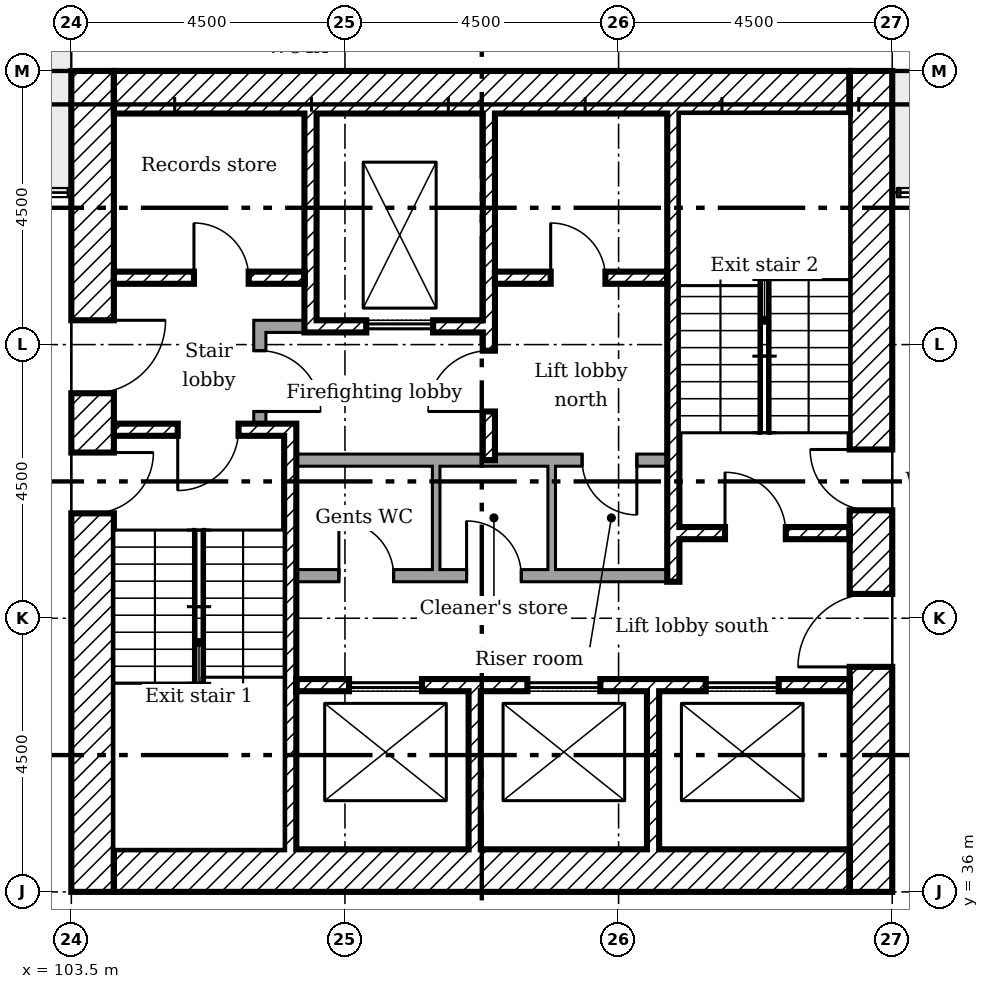
"""IFC4 building model, lengths in metres.
Left out: names, types, materials, properties, quantities, classifications, styles, units other than length and angle.
Written with IfcOpenShell. Run it as: python <this file> out.ifc"""

import sys

from ifc_helpers import new_model, si_unit, direction, frame, frame_2d, origin, place, context, subcontext, project, spatial, rectangle, extrude, element, fill, save


model = new_model("IFC4")
c1 = context("Model", 3, precision=1e-05, world=origin(), true_north=direction((0.0, 1.0)))
c2 = subcontext(c1, "Body", "Model", "MODEL_VIEW")
j1 = project(units=[si_unit("LENGTHUNIT", "METRE"), si_unit("PLANEANGLEUNIT", "RADIAN")], contexts=[c1])
p1 = place(None, origin())
s1 = spatial("IfcSite", under=j1, at=p1, CompositionType="ELEMENT")
p2 = place(p1, origin())
s2 = spatial("IfcBuilding", under=s1, at=p2, CompositionType="ELEMENT")
p3 = place(p2, frame((0.0, 0.0, 95.6)))
s3 = spatial("IfcBuildingStorey", under=s2, at=p3, CompositionType="ELEMENT", Elevation=95.6)
p4 = place(p3, frame((116.65, 36.0, 0.0), z_axis=(0.0, 0.0, 1.0), x_axis=(0.0, 1.0, 0.0)))
e1 = element("IfcWall", 1, at=p4, inside=s3, PredefinedType="SHEAR", context=c2, shape_type="SweptSolid", body=[
    extrude(rectangle(XDim=13.5, YDim=0.7, at=frame_2d((6.75, 0.0))), origin(), (0.0, 0.0, 1.0), 3.35),
])
p5 = place(p4, frame((3.7, 0.0, 0.0)))
e2 = element("IfcOpeningElement", 2, at=p5, cuts=e1, PredefinedType="OPENING", context=c2, shape_type="SweptSolid", body=[
    extrude(rectangle(XDim=1.2, YDim=2.1, at=frame_2d((0.6, 1.05))), frame((0.0, 0.36, 0.0), z_axis=(0.0, -1.0, 0.0), x_axis=(1.0, 0.0, 0.0)), (0.0, 0.0, 1.0), 0.72),
])
p6 = place(p4, frame((6.275, 0.0, 0.0)))
e3 = element("IfcOpeningElement", 3, at=p6, cuts=e1, PredefinedType="OPENING", context=c2, shape_type="SweptSolid", body=[
    extrude(rectangle(XDim=1.0, YDim=2.1, at=frame_2d((0.5, 1.05))), frame((0.0, 0.36, 0.0), z_axis=(0.0, -1.0, 0.0), x_axis=(1.0, 0.0, 0.0)), (0.0, 0.0, 1.0), 0.72),
])
for number, where in (
    (4, (104.2, 49.15, 0.0)),
    (5, (104.2, 36.35, 0.0)),
):
    element("IfcWall", number, at=place(p3, frame(where)), inside=s3, PredefinedType="SHEAR", context=c2, shape_type="SweptSolid", body=[
        extrude(rectangle(XDim=12.1, YDim=0.7, at=frame_2d((6.05, 0.0))), origin(), (0.0, 0.0, 1.0), 3.35),
    ])
p7 = place(p3, frame((103.85, 36.0, 0.0), z_axis=(0.0, 0.0, 1.0), x_axis=(0.0, 1.0, 0.0)))
e6 = element("IfcWall", 6, at=p7, inside=s3, PredefinedType="SHEAR", context=c2, shape_type="SweptSolid", body=[
    extrude(rectangle(XDim=13.5, YDim=0.7, at=frame_2d((6.75, 0.0))), origin(), (0.0, 0.0, 1.0), 3.35),
])
p8 = place(p7, frame((8.2, 0.0, 0.0)))
e7 = element("IfcOpeningElement", 7, at=p8, cuts=e6, PredefinedType="OPENING", context=c2, shape_type="SweptSolid", body=[
    extrude(rectangle(XDim=1.2, YDim=2.1, at=frame_2d((0.6, 1.05))), frame((0.0, 0.36, 0.0), z_axis=(0.0, -1.0, 0.0), x_axis=(1.0, 0.0, 0.0)), (0.0, 0.0, 1.0), 0.72),
])
p9 = place(p7, frame((6.225, 0.0, 0.0)))
e8 = element("IfcOpeningElement", 8, at=p9, cuts=e6, PredefinedType="OPENING", context=c2, shape_type="SweptSolid", body=[
    extrude(rectangle(XDim=1.0, YDim=2.1, at=frame_2d((0.5, 1.05))), frame((0.0, 0.36, 0.0), z_axis=(0.0, -1.0, 0.0), x_axis=(1.0, 0.0, 0.0)), (0.0, 0.0, 1.0), 0.72),
])
p10 = place(p3, frame((107.433, 48.8, 0.0), z_axis=(0.0, 0.0, 1.0), x_axis=(0.0, -1.0, 0.0)))
e9 = element("IfcWall", 9, at=p10, inside=s3, PredefinedType="SHEAR", context=c2, shape_type="SweptSolid", body=[
    extrude(rectangle(XDim=3.6, YDim=0.2, at=frame_2d((1.8, 0.0))), origin(), (0.0, 0.0, 1.0), 3.35),
])
p11 = place(p3, frame((110.367, 48.8, 0.0), z_axis=(0.0, 0.0, 1.0), x_axis=(0.0, -1.0, 0.0)))
e10 = element("IfcWall", 10, at=p11, inside=s3, PredefinedType="SHEAR", context=c2, shape_type="SweptSolid", body=[
    extrude(rectangle(XDim=5.7, YDim=0.2, at=frame_2d((2.85, 0.0))), origin(), (0.0, 0.0, 1.0), 3.35),
])
p12 = place(p11, frame((3.9, 0.0, 0.0)))
e11 = element("IfcOpeningElement", 11, at=p12, cuts=e10, PredefinedType="OPENING", context=c2, shape_type="SweptSolid", body=[
    extrude(rectangle(XDim=1.0, YDim=2.1, at=frame_2d((0.5, 1.05))), frame((0.0, 0.11, 0.0), z_axis=(0.0, -1.0, 0.0), x_axis=(1.0, 0.0, 0.0)), (0.0, 0.0, 1.0), 0.22),
])
for number, where, z_axis, x_axis in (
    (12, (110.133, 36.7, 0.0), (0.0, 0.0, 1.0), (0.0, 1.0, 0.0)),
    (13, (113.067, 36.7, 0.0), (0.0, 0.0, 1.0), (0.0, 1.0, 0.0)),
):
    element("IfcWall", number, at=place(p3, frame(where, z_axis=z_axis, x_axis=x_axis)), inside=s3, PredefinedType="SHEAR", context=c2, shape_type="SweptSolid", body=[
        extrude(rectangle(XDim=2.6, YDim=0.2, at=frame_2d((1.3, 0.0))), origin(), (0.0, 0.0, 1.0), 3.35),
    ])
p13 = place(p3, frame((106.5, 45.3, 0.0)))
e14 = element("IfcWall", 14, at=p13, inside=s3, PredefinedType="PARTITIONING", context=c2, shape_type="SweptSolid", body=[
    extrude(rectangle(XDim=0.833, YDim=0.2, at=frame_2d((0.417, 0.0))), origin(), (0.0, 0.0, 1.0), 3.35),
])
p14 = place(p3, frame((106.6, 43.7, 0.0), z_axis=(0.0, 0.0, 1.0), x_axis=(0.0, 1.0, 0.0)))
e15 = element("IfcWall", 15, at=p14, inside=s3, PredefinedType="PARTITIONING", context=c2, shape_type="SweptSolid", body=[
    extrude(rectangle(XDim=1.5, YDim=0.2, at=frame_2d((0.75, 0.0))), origin(), (0.0, 0.0, 1.0), 3.35),
])
p15 = place(p14, frame((0.2, 0.0, 0.0)))
e16 = element("IfcOpeningElement", 16, at=p15, cuts=e15, PredefinedType="OPENING", context=c2, shape_type="SweptSolid", body=[
    extrude(rectangle(XDim=1.0, YDim=2.1, at=frame_2d((0.5, 1.05))), frame((0.0, 0.11, 0.0), z_axis=(0.0, -1.0, 0.0), x_axis=(1.0, 0.0, 0.0)), (0.0, 0.0, 1.0), 0.22),
])
p16 = place(p3, frame((104.2, 46.1, 0.0)))
e17 = element("IfcWall", 17, at=p16, inside=s3, PredefinedType="SHEAR", context=c2, shape_type="SweptSolid", body=[
    extrude(rectangle(XDim=3.133, YDim=0.2, at=frame_2d((1.567, 0.0))), origin(), (0.0, 0.0, 1.0), 3.35),
])
p17 = place(p16, frame((1.317, 0.0, 0.0)))
e18 = element("IfcOpeningElement", 18, at=p17, cuts=e17, PredefinedType="OPENING", context=c2, shape_type="SweptSolid", body=[
    extrude(rectangle(XDim=0.9, YDim=2.1, at=frame_2d((0.45, 1.05))), frame((0.0, 0.11, 0.0), z_axis=(0.0, -1.0, 0.0), x_axis=(1.0, 0.0, 0.0)), (0.0, 0.0, 1.0), 0.22),
])
p18 = place(p3, frame((110.467, 46.1, 0.0)))
e19 = element("IfcWall", 19, at=p18, inside=s3, PredefinedType="SHEAR", context=c2, shape_type="SweptSolid", body=[
    extrude(rectangle(XDim=2.833, YDim=0.2, at=frame_2d((1.417, 0.0))), origin(), (0.0, 0.0, 1.0), 3.35),
])
p19 = place(p18, frame((0.917, 0.0, 0.0)))
e20 = element("IfcOpeningElement", 20, at=p19, cuts=e19, PredefinedType="OPENING", context=c2, shape_type="SweptSolid", body=[
    extrude(rectangle(XDim=0.9, YDim=2.1, at=frame_2d((0.45, 1.05))), frame((0.0, 0.11, 0.0), z_axis=(0.0, -1.0, 0.0), x_axis=(1.0, 0.0, 0.0)), (0.0, 0.0, 1.0), 0.22),
])
p20 = place(p3, frame((107.533, 45.3, 0.0)))
e21 = element("IfcWall", 21, at=p20, inside=s3, PredefinedType="SHEAR", context=c2, shape_type="SweptSolid", body=[
    extrude(rectangle(XDim=2.733, YDim=0.2, at=frame_2d((1.367, 0.0))), origin(), (0.0, 0.0, 1.0), 3.35),
])
p21 = place(p20, frame((0.817, 0.0, 0.0)))
e22 = element("IfcOpeningElement", 22, at=p21, cuts=e21, PredefinedType="OPENING", context=c2, shape_type="SweptSolid", body=[
    extrude(rectangle(XDim=1.1, YDim=2.1, at=frame_2d((0.55, 1.05))), frame((0.0, 0.11, 0.0), z_axis=(0.0, -1.0, 0.0), x_axis=(1.0, 0.0, 0.0)), (0.0, 0.0, 1.0), 0.22),
])
p22 = place(p3, frame((107.2, 39.4, 0.0)))
e23 = element("IfcWall", 23, at=p22, inside=s3, PredefinedType="SHEAR", context=c2, shape_type="SweptSolid", body=[
    extrude(rectangle(XDim=9.1, YDim=0.2, at=frame_2d((4.55, 0.0))), origin(), (0.0, 0.0, 1.0), 3.35),
])
p23 = place(p22, frame((0.867, 0.0, 0.0)))
e24 = element("IfcOpeningElement", 24, at=p23, cuts=e23, PredefinedType="OPENING", context=c2, shape_type="SweptSolid", body=[
    extrude(rectangle(XDim=1.2, YDim=2.1, at=frame_2d((0.6, 1.05))), frame((0.0, 0.11, 0.0), z_axis=(0.0, -1.0, 0.0), x_axis=(1.0, 0.0, 0.0)), (0.0, 0.0, 1.0), 0.22),
])
p24 = place(p22, frame((3.8, 0.0, 0.0)))
e25 = element("IfcOpeningElement", 25, at=p24, cuts=e23, PredefinedType="OPENING", context=c2, shape_type="SweptSolid", body=[
    extrude(rectangle(XDim=1.2, YDim=2.1, at=frame_2d((0.6, 1.05))), frame((0.0, 0.11, 0.0), z_axis=(0.0, -1.0, 0.0), x_axis=(1.0, 0.0, 0.0)), (0.0, 0.0, 1.0), 0.22),
])
p25 = place(p22, frame((6.733, 0.0, 0.0)))
e26 = element("IfcOpeningElement", 26, at=p25, cuts=e23, PredefinedType="OPENING", context=c2, shape_type="SweptSolid", body=[
    extrude(rectangle(XDim=1.2, YDim=2.1, at=frame_2d((0.6, 1.05))), frame((0.0, 0.11, 0.0), z_axis=(0.0, -1.0, 0.0), x_axis=(1.0, 0.0, 0.0)), (0.0, 0.0, 1.0), 0.22),
])
p26 = place(p3, frame((107.1, 36.7, 0.0), z_axis=(0.0, 0.0, 1.0), x_axis=(0.0, 1.0, 0.0)))
e27 = element("IfcWall", 27, at=p26, inside=s3, PredefinedType="SHEAR", context=c2, shape_type="SweptSolid", body=[
    extrude(rectangle(XDim=7.0, YDim=0.2, at=frame_2d((3.5, 0.0))), origin(), (0.0, 0.0, 1.0), 3.35),
])
p27 = place(p3, frame((104.2, 43.6, 0.0)))
e28 = element("IfcWall", 28, at=p27, inside=s3, PredefinedType="SHEAR", context=c2, shape_type="SweptSolid", body=[
    extrude(rectangle(XDim=2.8, YDim=0.2, at=frame_2d((1.4, 0.0))), origin(), (0.0, 0.0, 1.0), 3.35),
])
p28 = place(p27, frame((1.05, 0.0, 0.0)))
e29 = element("IfcOpeningElement", 29, at=p28, cuts=e28, PredefinedType="OPENING", context=c2, shape_type="SweptSolid", body=[
    extrude(rectangle(XDim=1.0, YDim=2.1, at=frame_2d((0.5, 1.05))), frame((0.0, 0.11, 0.0), z_axis=(0.0, -1.0, 0.0), x_axis=(1.0, 0.0, 0.0)), (0.0, 0.0, 1.0), 0.22),
])
p29 = place(p3, frame((113.5, 41.9, 0.0)))
e30 = element("IfcWall", 30, at=p29, inside=s3, PredefinedType="SHEAR", context=c2, shape_type="SweptSolid", body=[
    extrude(rectangle(XDim=2.8, YDim=0.2, at=frame_2d((1.4, 0.0))), origin(), (0.0, 0.0, 1.0), 3.35),
])
p30 = place(p29, frame((0.75, 0.0, 0.0)))
e31 = element("IfcOpeningElement", 31, at=p30, cuts=e30, PredefinedType="OPENING", context=c2, shape_type="SweptSolid", body=[
    extrude(rectangle(XDim=1.0, YDim=2.1, at=frame_2d((0.5, 1.05))), frame((0.0, 0.11, 0.0), z_axis=(0.0, -1.0, 0.0), x_axis=(1.0, 0.0, 0.0)), (0.0, 0.0, 1.0), 0.22),
])
p31 = place(p3, frame((113.4, 41.1, 0.0), z_axis=(0.0, 0.0, 1.0), x_axis=(0.0, 1.0, 0.0)))
e32 = element("IfcWall", 32, at=p31, inside=s3, PredefinedType="SHEAR", context=c2, shape_type="SweptSolid", body=[
    extrude(rectangle(XDim=7.7, YDim=0.2, at=frame_2d((3.85, 0.0))), origin(), (0.0, 0.0, 1.0), 3.35),
])
p32 = place(p3, frame((107.2, 43.1, 0.0)))
e33 = element("IfcWall", 33, at=p32, inside=s3, PredefinedType="PARTITIONING", context=c2, shape_type="SweptSolid", body=[
    extrude(rectangle(XDim=6.1, YDim=0.2, at=frame_2d((3.05, 0.0))), origin(), (0.0, 0.0, 1.0), 3.35),
])
p33 = place(p32, frame((4.7, 0.0, 0.0)))
e34 = element("IfcOpeningElement", 34, at=p33, cuts=e33, PredefinedType="OPENING", context=c2, shape_type="SweptSolid", body=[
    extrude(rectangle(XDim=0.9, YDim=2.1, at=frame_2d((0.45, 1.05))), frame((0.0, 0.11, 0.0), z_axis=(0.0, -1.0, 0.0), x_axis=(1.0, 0.0, 0.0)), (0.0, 0.0, 1.0), 0.22),
])
p34 = place(p3, frame((107.2, 41.2, 0.0)))
e35 = element("IfcWall", 35, at=p34, inside=s3, PredefinedType="PARTITIONING", context=c2, shape_type="SweptSolid", body=[
    extrude(rectangle(XDim=6.1, YDim=0.2, at=frame_2d((3.05, 0.0))), origin(), (0.0, 0.0, 1.0), 3.35),
])
p35 = place(p34, frame((0.7, 0.0, 0.0)))
e36 = element("IfcOpeningElement", 36, at=p35, cuts=e35, PredefinedType="OPENING", context=c2, shape_type="SweptSolid", body=[
    extrude(rectangle(XDim=0.9, YDim=2.1, at=frame_2d((0.45, 1.05))), frame((0.0, 0.11, 0.0), z_axis=(0.0, -1.0, 0.0), x_axis=(1.0, 0.0, 0.0)), (0.0, 0.0, 1.0), 0.22),
])
p36 = place(p34, frame((2.8, 0.0, 0.0)))
e37 = element("IfcOpeningElement", 37, at=p36, cuts=e35, PredefinedType="OPENING", context=c2, shape_type="SweptSolid", body=[
    extrude(rectangle(XDim=0.9, YDim=2.1, at=frame_2d((0.45, 1.05))), frame((0.0, 0.11, 0.0), z_axis=(0.0, -1.0, 0.0), x_axis=(1.0, 0.0, 0.0)), (0.0, 0.0, 1.0), 0.22),
])
for number, where, z_axis, x_axis in (
    (38, (109.5, 41.3, 0.0), (0.0, 0.0, 1.0), (0.0, 1.0, 0.0)),
    (39, (111.4, 41.3, 0.0), (0.0, 0.0, 1.0), (0.0, 1.0, 0.0)),
):
    element("IfcWall", number, at=place(p3, frame(where, z_axis=z_axis, x_axis=x_axis)), inside=s3, PredefinedType="PARTITIONING", context=c2, shape_type="SweptSolid", body=[
        extrude(rectangle(XDim=1.7, YDim=0.125, at=frame_2d((0.85, 0.0))), origin(), (0.0, 0.0, 1.0), 3.35),
    ])
p37 = place(p8, frame((1.2, 0.0, 0.0), x_axis=(-1.0, 0.0, 0.0)))
e40 = element("IfcDoor", 40, at=p37, inside=s3, OperationType="SINGLE_SWING_RIGHT", PredefinedType="DOOR", context=c2, shape_type="SweptSolid", body=[
    extrude(rectangle(XDim=1.2, YDim=2.1, at=frame_2d((0.6, 1.05))), frame((0.0, 0.025, 0.0), z_axis=(0.0, -1.0, 0.0), x_axis=(1.0, 0.0, 0.0)), (0.0, 0.0, 1.0), 0.05),
])
fill(e7, e40)
p38 = place(p5, origin())
e41 = element("IfcDoor", 41, at=p38, inside=s3, OperationType="SINGLE_SWING_RIGHT", PredefinedType="DOOR", context=c2, shape_type="SweptSolid", body=[
    extrude(rectangle(XDim=1.2, YDim=2.1, at=frame_2d((0.6, 1.05))), frame((0.0, 0.025, 0.0), z_axis=(0.0, -1.0, 0.0), x_axis=(1.0, 0.0, 0.0)), (0.0, 0.0, 1.0), 0.05),
])
fill(e2, e41)
p39 = place(p28, frame((1.0, 0.0, 0.0), x_axis=(-1.0, 0.0, 0.0)))
e42 = element("IfcDoor", 42, at=p39, inside=s3, OperationType="SINGLE_SWING_LEFT", PredefinedType="DOOR", context=c2, shape_type="SweptSolid", body=[
    extrude(rectangle(XDim=1.0, YDim=2.1, at=frame_2d((0.5, 1.05))), frame((0.0, 0.025, 0.0), z_axis=(0.0, -1.0, 0.0), x_axis=(1.0, 0.0, 0.0)), (0.0, 0.0, 1.0), 0.05),
])
fill(e29, e42)
p40 = place(p9, frame((1.0, 0.0, 0.0), x_axis=(-1.0, 0.0, 0.0)))
e43 = element("IfcDoor", 43, at=p40, inside=s3, OperationType="SINGLE_SWING_RIGHT", PredefinedType="DOOR", context=c2, shape_type="SweptSolid", body=[
    extrude(rectangle(XDim=1.0, YDim=2.1, at=frame_2d((0.5, 1.05))), frame((0.0, 0.025, 0.0), z_axis=(0.0, -1.0, 0.0), x_axis=(1.0, 0.0, 0.0)), (0.0, 0.0, 1.0), 0.05),
])
fill(e8, e43)
p41 = place(p30, origin())
e44 = element("IfcDoor", 44, at=p41, inside=s3, OperationType="SINGLE_SWING_RIGHT", PredefinedType="DOOR", context=c2, shape_type="SweptSolid", body=[
    extrude(rectangle(XDim=1.0, YDim=2.1, at=frame_2d((0.5, 1.05))), frame((0.0, 0.025, 0.0), z_axis=(0.0, -1.0, 0.0), x_axis=(1.0, 0.0, 0.0)), (0.0, 0.0, 1.0), 0.05),
])
fill(e31, e44)
p42 = place(p6, origin())
e45 = element("IfcDoor", 45, at=p42, inside=s3, OperationType="SINGLE_SWING_LEFT", PredefinedType="DOOR", context=c2, shape_type="SweptSolid", body=[
    extrude(rectangle(XDim=1.0, YDim=2.1, at=frame_2d((0.5, 1.05))), frame((0.0, 0.025, 0.0), z_axis=(0.0, -1.0, 0.0), x_axis=(1.0, 0.0, 0.0)), (0.0, 0.0, 1.0), 0.05),
])
fill(e3, e45)
p43 = place(p12, frame((1.0, 0.0, 0.0), x_axis=(-1.0, 0.0, 0.0)))
e46 = element("IfcDoor", 46, at=p43, inside=s3, OperationType="SINGLE_SWING_RIGHT", PredefinedType="DOOR", context=c2, shape_type="SweptSolid", body=[
    extrude(rectangle(XDim=1.0, YDim=2.1, at=frame_2d((0.5, 1.05))), frame((0.0, 0.025, 0.0), z_axis=(0.0, -1.0, 0.0), x_axis=(1.0, 0.0, 0.0)), (0.0, 0.0, 1.0), 0.05),
])
fill(e11, e46)
p44 = place(p15, frame((1.0, 0.0, 0.0), x_axis=(-1.0, 0.0, 0.0)))
e47 = element("IfcDoor", 47, at=p44, inside=s3, OperationType="SINGLE_SWING_LEFT", PredefinedType="DOOR", context=c2, shape_type="SweptSolid", body=[
    extrude(rectangle(XDim=1.0, YDim=2.1, at=frame_2d((0.5, 1.05))), frame((0.0, 0.025, 0.0), z_axis=(0.0, -1.0, 0.0), x_axis=(1.0, 0.0, 0.0)), (0.0, 0.0, 1.0), 0.05),
])
fill(e16, e47)
p45 = place(p17, origin())
e48 = element("IfcDoor", 48, at=p45, inside=s3, OperationType="SINGLE_SWING_RIGHT", PredefinedType="DOOR", context=c2, shape_type="SweptSolid", body=[
    extrude(rectangle(XDim=0.9, YDim=2.1, at=frame_2d((0.45, 1.05))), frame((0.0, 0.025, 0.0), z_axis=(0.0, -1.0, 0.0), x_axis=(1.0, 0.0, 0.0)), (0.0, 0.0, 1.0), 0.05),
])
fill(e18, e48)
p46 = place(p19, origin())
e49 = element("IfcDoor", 49, at=p46, inside=s3, OperationType="SINGLE_SWING_RIGHT", PredefinedType="DOOR", context=c2, shape_type="SweptSolid", body=[
    extrude(rectangle(XDim=0.9, YDim=2.1, at=frame_2d((0.45, 1.05))), frame((0.0, 0.025, 0.0), z_axis=(0.0, -1.0, 0.0), x_axis=(1.0, 0.0, 0.0)), (0.0, 0.0, 1.0), 0.05),
])
fill(e20, e49)
p47 = place(p35, origin())
e50 = element("IfcDoor", 50, at=p47, inside=s3, OperationType="SINGLE_SWING_RIGHT", PredefinedType="DOOR", context=c2, shape_type="SweptSolid", body=[
    extrude(rectangle(XDim=0.9, YDim=2.1, at=frame_2d((0.45, 1.05))), frame((0.0, 0.025, 0.0), z_axis=(0.0, -1.0, 0.0), x_axis=(1.0, 0.0, 0.0)), (0.0, 0.0, 1.0), 0.05),
])
fill(e36, e50)
p48 = place(p36, origin())
e51 = element("IfcDoor", 51, at=p48, inside=s3, OperationType="SINGLE_SWING_RIGHT", PredefinedType="DOOR", context=c2, shape_type="SweptSolid", body=[
    extrude(rectangle(XDim=0.9, YDim=2.1, at=frame_2d((0.45, 1.05))), frame((0.0, 0.025, 0.0), z_axis=(0.0, -1.0, 0.0), x_axis=(1.0, 0.0, 0.0)), (0.0, 0.0, 1.0), 0.05),
])
fill(e37, e51)
p49 = place(p33, frame((0.9, 0.0, 0.0), x_axis=(-1.0, 0.0, 0.0)))
e52 = element("IfcDoor", 52, at=p49, inside=s3, OperationType="SINGLE_SWING_RIGHT", PredefinedType="DOOR", context=c2, shape_type="SweptSolid", body=[
    extrude(rectangle(XDim=0.9, YDim=2.1, at=frame_2d((0.45, 1.05))), frame((0.0, 0.025, 0.0), z_axis=(0.0, -1.0, 0.0), x_axis=(1.0, 0.0, 0.0)), (0.0, 0.0, 1.0), 0.05),
])
fill(e34, e52)
p50 = place(p21, origin())
e53 = element("IfcDoor", 53, at=p50, inside=s3, OperationType="SLIDING_TO_LEFT", PredefinedType="DOOR", context=c2, shape_type="SweptSolid", body=[
    extrude(rectangle(XDim=1.1, YDim=2.1, at=frame_2d((0.55, 1.05))), frame((0.0, 0.025, 0.0), z_axis=(0.0, -1.0, 0.0), x_axis=(1.0, 0.0, 0.0)), (0.0, 0.0, 1.0), 0.05),
])
fill(e22, e53)
p51 = place(p23, origin())
e54 = element("IfcDoor", 54, at=p51, inside=s3, OperationType="SLIDING_TO_LEFT", PredefinedType="DOOR", context=c2, shape_type="SweptSolid", body=[
    extrude(rectangle(XDim=1.2, YDim=2.1, at=frame_2d((0.6, 1.05))), frame((0.0, 0.025, 0.0), z_axis=(0.0, -1.0, 0.0), x_axis=(1.0, 0.0, 0.0)), (0.0, 0.0, 1.0), 0.05),
])
fill(e24, e54)
p52 = place(p24, origin())
e55 = element("IfcDoor", 55, at=p52, inside=s3, OperationType="SLIDING_TO_LEFT", PredefinedType="DOOR", context=c2, shape_type="SweptSolid", body=[
    extrude(rectangle(XDim=1.2, YDim=2.1, at=frame_2d((0.6, 1.05))), frame((0.0, 0.025, 0.0), z_axis=(0.0, -1.0, 0.0), x_axis=(1.0, 0.0, 0.0)), (0.0, 0.0, 1.0), 0.05),
])
fill(e25, e55)
p53 = place(p25, origin())
e56 = element("IfcDoor", 56, at=p53, inside=s3, OperationType="SLIDING_TO_LEFT", PredefinedType="DOOR", context=c2, shape_type="SweptSolid", body=[
    extrude(rectangle(XDim=1.2, YDim=2.1, at=frame_2d((0.6, 1.05))), frame((0.0, 0.025, 0.0), z_axis=(0.0, -1.0, 0.0), x_axis=(1.0, 0.0, 0.0)), (0.0, 0.0, 1.0), 0.05),
])
fill(e26, e56)
save(model, sys.argv[1])
